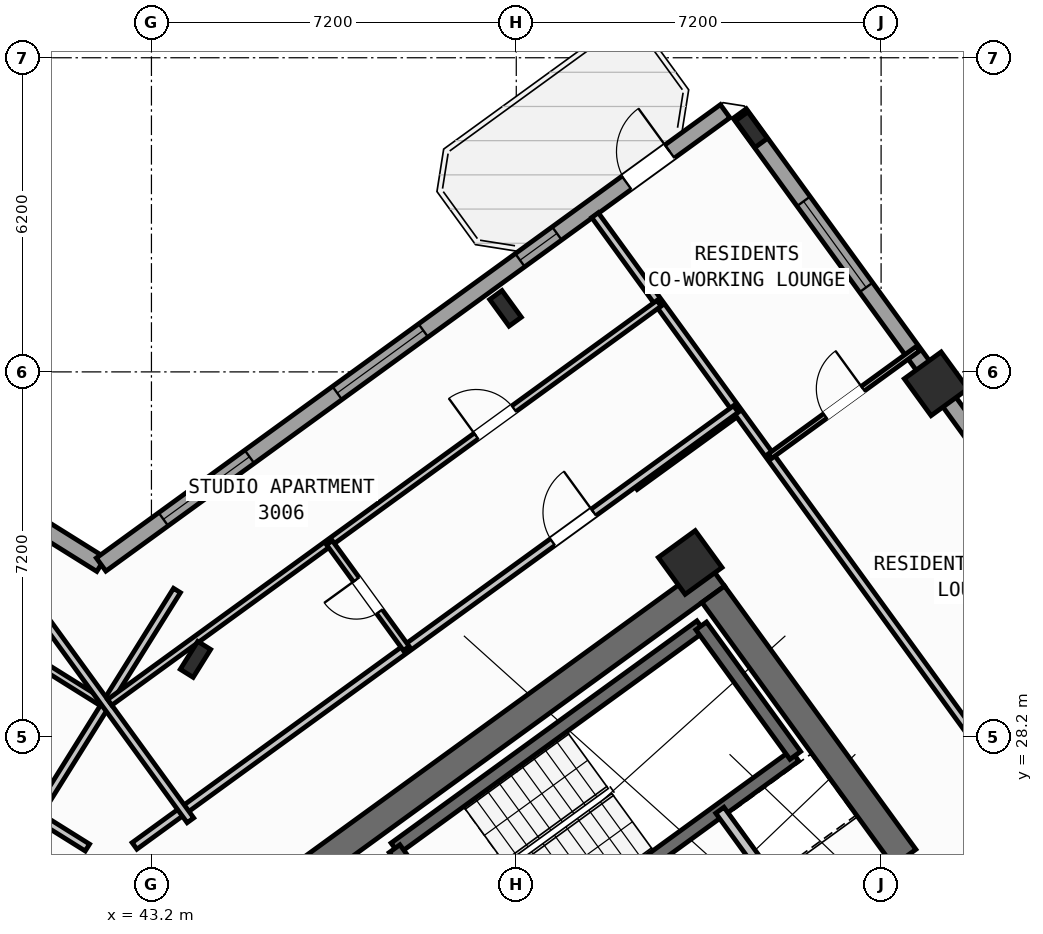
"""IFC4 building model, lengths in metres.
Left out: names, types, materials, properties, quantities, classifications, styles, units other than length and angle.
Written with IfcOpenShell. Run it as: python <this file> out.ifc"""

import sys

from ifc_helpers import new_model, si_unit, direction, frame, frame_2d, origin, origin_2d, place, context, subcontext, project, spatial, rectangle, hollow_rectangle, i_section, extrude, source, transform, mapped, element, fill, save


model = new_model("IFC4")
c1 = context("Model", 3, precision=1e-05, world=origin(), true_north=direction((0.0, 1.0)))
c2 = subcontext(c1, "Body", "Model", "MODEL_VIEW")
j1 = project(units=[si_unit("LENGTHUNIT", "METRE"), si_unit("PLANEANGLEUNIT", "RADIAN")], contexts=[c1])
p1 = place(None, origin())
s1 = spatial("IfcSite", under=j1, at=p1, CompositionType="ELEMENT")
p2 = place(p1, origin())
s2 = spatial("IfcBuilding", under=s1, at=p2, CompositionType="ELEMENT")
p3 = place(p2, frame((0.0, 0.0, 119.7)))
s3 = spatial("IfcBuildingStorey", under=s2, at=p3, CompositionType="ELEMENT", Elevation=119.7)
p4 = place(p3, frame((44.365, 24.142, 0.0), z_axis=(0.0, 0.0, 1.0), x_axis=(0.809024304885, 0.587775190107, 0.0)))
e1 = element("IfcWall", 1, at=p4, inside=s3, PredefinedType="SHEAR", context=c2, shape_type="SweptSolid", body=[
    extrude(rectangle(XDim=12.34, YDim=0.55, at=frame_2d((6.17, 0.0))), origin(), (0.0, 0.0, 1.0), 3.35),
])
p5 = place(p3, frame((58.064, 25.813, 0.0), z_axis=(0.0, 0.0, 1.0), x_axis=(-0.587764933797, 0.809031756236, 0.0)))
e2 = element("IfcWall", 2, at=p5, inside=s3, PredefinedType="SHEAR", context=c2, shape_type="SweptSolid", body=[
    extrude(rectangle(XDim=6.425, YDim=0.55, at=frame_2d((3.212, 0.0))), origin(), (0.0, 0.0, 1.0), 3.35),
])
m1 = source(origin(), c2, "Body", "SweptSolid", [
    extrude(i_section(OverallWidth=0.3, OverallDepth=0.65, WebThickness=0.016, FlangeThickness=0.031, at=origin_2d()), origin(), (0.0, 0.0, 1.0), 3.6),
])
p6 = place(p3, frame((44.068, 29.726, 0.0), z_axis=(0.0, 0.0, 1.0), x_axis=(-0.848048096156, 0.529919264233, 0.0)))
e3 = element("IfcColumn", 3, at=p6, inside=s3, PredefinedType="COLUMN", context=c2, shape_type="MappedRepresentation", body=[
    mapped(m1, transform((0.0, 0.0, 0.0), scale=1.0)),
])
m2 = source(origin(), c2, "Body", "SweptSolid", [
    extrude(hollow_rectangle(XDim=0.9, YDim=0.9, WallThickness=0.036, at=origin_2d()), origin(), (0.0, 0.0, 1.0), 3.6),
])
p7 = place(p3, frame((53.832, 31.638, 0.0), z_axis=(0.0, 0.0, 1.0), x_axis=(0.809016994375, 0.587785252292, 0.0)))
e4 = element("IfcColumn", 4, at=p7, inside=s3, PredefinedType="COLUMN", context=c2, shape_type="MappedRepresentation", body=[
    mapped(m2, transform((0.0, 0.0, 0.0), scale=1.0)),
])
p8 = place(p3, frame((50.188, 36.654, 0.0), z_axis=(0.0, 0.0, 1.0), x_axis=(0.809016994375, 0.587785252292, 0.0)))
e5 = element("IfcColumn", 5, at=p8, inside=s3, PredefinedType="COLUMN", context=c2, shape_type="MappedRepresentation", body=[
    mapped(m1, transform((0.0, 0.0, 0.0), scale=1.0)),
])
p9 = place(p3, frame((58.686, 35.165, 0.0), z_axis=(0.0, 0.0, 1.0), x_axis=(0.809016994375, 0.587785252292, 0.0)))
e6 = element("IfcColumn", 6, at=p9, inside=s3, PredefinedType="COLUMN", context=c2, shape_type="MappedRepresentation", body=[
    mapped(m2, transform((0.0, 0.0, 0.0), scale=1.0)),
])
p10 = place(p3, frame((55.042, 40.181, 0.0), z_axis=(0.0, 0.0, 1.0), x_axis=(0.809016994375, 0.587785252292, 0.0)))
e7 = element("IfcColumn", 7, at=p10, inside=s3, PredefinedType="COLUMN", context=c2, shape_type="MappedRepresentation", body=[
    mapped(m1, transform((0.0, 0.0, 0.0), scale=1.0)),
])
p11 = place(p3, frame((17.424, 47.083, 0.0), z_axis=(0.0, 0.0, 1.0), x_axis=(0.848049927979, -0.529916332693, 0.0)))
e8 = element("IfcWall", 8, at=p11, inside=s3, PredefinedType="STANDARD", context=c2, shape_type="SweptSolid", body=[
    extrude(rectangle(XDim=29.223, YDim=0.32, at=frame_2d((14.612, 0.0))), origin(), (0.0, 0.0, 1.0), 3.35),
])
p12 = place(p11, frame((8.839, 0.0, 0.0)))
e9 = element("IfcOpeningElement", 9, at=p12, cuts=e8, PredefinedType="OPENING", context=c2, shape_type="SweptSolid", body=[
    extrude(rectangle(XDim=1.05, YDim=2.15, at=frame_2d((0.525, 1.075))), frame((0.0, 0.17, 0.0), z_axis=(0.0, -1.0, 0.0), x_axis=(1.0, 0.0, 0.0)), (0.0, 0.0, 1.0), 0.34),
])
p13 = place(p11, frame((0.719, 0.0, 0.85)))
e10 = element("IfcOpeningElement", 10, at=p13, cuts=e8, PredefinedType="OPENING", context=c2, shape_type="SweptSolid", body=[
    extrude(rectangle(XDim=1.8, YDim=1.5, at=frame_2d((0.9, 0.75))), frame((0.0, 0.17, 0.0), z_axis=(0.0, -1.0, 0.0), x_axis=(1.0, 0.0, 0.0)), (0.0, 0.0, 1.0), 0.34),
])
p14 = place(p11, frame((3.981, 0.0, 0.85)))
e11 = element("IfcOpeningElement", 11, at=p14, cuts=e8, PredefinedType="OPENING", context=c2, shape_type="SweptSolid", body=[
    extrude(rectangle(XDim=1.5, YDim=1.5, at=frame_2d((0.75, 0.75))), frame((0.0, 0.17, 0.0), z_axis=(0.0, -1.0, 0.0), x_axis=(1.0, 0.0, 0.0)), (0.0, 0.0, 1.0), 0.34),
])
p15 = place(p11, frame((7.021, 0.0, 0.95)))
e12 = element("IfcOpeningElement", 12, at=p15, cuts=e8, PredefinedType="OPENING", context=c2, shape_type="SweptSolid", body=[
    extrude(rectangle(XDim=1.2, YDim=1.4, at=frame_2d((0.6, 0.7))), frame((0.0, 0.17, 0.0), z_axis=(0.0, -1.0, 0.0), x_axis=(1.0, 0.0, 0.0)), (0.0, 0.0, 1.0), 0.34),
])
p16 = place(p11, frame((14.471, 0.0, 0.95)))
e13 = element("IfcOpeningElement", 13, at=p16, cuts=e8, PredefinedType="OPENING", context=c2, shape_type="SweptSolid", body=[
    extrude(rectangle(XDim=1.2, YDim=1.4, at=frame_2d((0.6, 0.7))), frame((0.0, 0.17, 0.0), z_axis=(0.0, -1.0, 0.0), x_axis=(1.0, 0.0, 0.0)), (0.0, 0.0, 1.0), 0.34),
])
p17 = place(p11, frame((17.254, 0.0, 1.0)))
e14 = element("IfcOpeningElement", 14, at=p17, cuts=e8, PredefinedType="OPENING", context=c2, shape_type="SweptSolid", body=[
    extrude(rectangle(XDim=0.9, YDim=1.25, at=frame_2d((0.45, 0.625))), frame((0.0, 0.17, 0.0), z_axis=(0.0, -1.0, 0.0), x_axis=(1.0, 0.0, 0.0)), (0.0, 0.0, 1.0), 0.34),
])
p18 = place(p11, frame((20.764, 0.0, 0.8)))
e15 = element("IfcOpeningElement", 15, at=p18, cuts=e8, PredefinedType="OPENING", context=c2, shape_type="SweptSolid", body=[
    extrude(rectangle(XDim=2.1, YDim=1.55, at=frame_2d((1.05, 0.775))), frame((0.0, 0.17, 0.0), z_axis=(0.0, -1.0, 0.0), x_axis=(1.0, 0.0, 0.0)), (0.0, 0.0, 1.0), 0.34),
])
p19 = place(p11, frame((25.403, 0.0, 0.8)))
e16 = element("IfcOpeningElement", 16, at=p19, cuts=e8, PredefinedType="OPENING", context=c2, shape_type="SweptSolid", body=[
    extrude(rectangle(XDim=2.1, YDim=1.55, at=frame_2d((1.05, 0.775))), frame((0.0, 0.17, 0.0), z_axis=(0.0, -1.0, 0.0), x_axis=(1.0, 0.0, 0.0)), (0.0, 0.0, 1.0), 0.34),
])
p20 = place(p3, frame((42.207, 31.597, 0.0), z_axis=(0.0, 0.0, 1.0), x_axis=(0.809020333377, 0.587780656523, 0.0)))
e17 = element("IfcWall", 17, at=p20, inside=s3, PredefinedType="STANDARD", context=c2, shape_type="SweptSolid", body=[
    extrude(rectangle(XDim=15.223, YDim=0.32, at=frame_2d((7.611, 0.0))), origin(), (0.0, 0.0, 1.0), 3.35),
])
p21 = place(p20, frame((12.82, 0.0, 0.0)))
e18 = element("IfcOpeningElement", 18, at=p21, cuts=e17, PredefinedType="OPENING", context=c2, shape_type="SweptSolid", body=[
    extrude(rectangle(XDim=1.05, YDim=2.15, at=frame_2d((0.525, 1.075))), frame((0.0, 0.17, 0.0), z_axis=(0.0, -1.0, 0.0), x_axis=(1.0, 0.0, 0.0)), (0.0, 0.0, 1.0), 0.34),
])
p22 = place(p20, frame((1.52, 0.0, 0.8)))
e19 = element("IfcOpeningElement", 19, at=p22, cuts=e17, PredefinedType="OPENING", context=c2, shape_type="SweptSolid", body=[
    extrude(rectangle(XDim=2.1, YDim=1.55, at=frame_2d((1.05, 0.775))), frame((0.0, 0.17, 0.0), z_axis=(0.0, -1.0, 0.0), x_axis=(1.0, 0.0, 0.0)), (0.0, 0.0, 1.0), 0.34),
])
p23 = place(p20, frame((5.76, 0.0, 0.8)))
e20 = element("IfcOpeningElement", 20, at=p23, cuts=e17, PredefinedType="OPENING", context=c2, shape_type="SweptSolid", body=[
    extrude(rectangle(XDim=2.1, YDim=1.55, at=frame_2d((1.05, 0.775))), frame((0.0, 0.17, 0.0), z_axis=(0.0, -1.0, 0.0), x_axis=(1.0, 0.0, 0.0)), (0.0, 0.0, 1.0), 0.34),
])
p24 = place(p20, frame((10.219, 0.0, 1.0)))
e21 = element("IfcOpeningElement", 21, at=p24, cuts=e17, PredefinedType="OPENING", context=c2, shape_type="SweptSolid", body=[
    extrude(rectangle(XDim=0.9, YDim=1.25, at=frame_2d((0.45, 0.625))), frame((0.0, 0.17, 0.0), z_axis=(0.0, -1.0, 0.0), x_axis=(1.0, 0.0, 0.0)), (0.0, 0.0, 1.0), 0.34),
])
p25 = place(p3, frame((54.81, 40.5, 0.0), z_axis=(0.0, 0.0, 1.0), x_axis=(0.587783625747, -0.809018176127, 0.0)))
e22 = element("IfcWall", 22, at=p25, inside=s3, PredefinedType="STANDARD", context=c2, shape_type="SweptSolid", body=[
    extrude(rectangle(XDim=21.587, YDim=0.32, at=frame_2d((10.794, 0.0))), origin(), (0.0, 0.0, 1.0), 2.775),
])
p26 = place(p25, frame((2.143, 0.0, 0.8)))
e23 = element("IfcOpeningElement", 23, at=p26, cuts=e22, PredefinedType="OPENING", context=c2, shape_type="SweptSolid", body=[
    extrude(rectangle(XDim=2.1, YDim=1.55, at=frame_2d((1.05, 0.775))), frame((0.0, 0.17, 0.0), z_axis=(0.0, -1.0, 0.0), x_axis=(1.0, 0.0, 0.0)), (0.0, 0.0, 1.0), 0.34),
])
p27 = place(p25, frame((9.344, 0.0, 0.85)))
e24 = element("IfcOpeningElement", 24, at=p27, cuts=e22, PredefinedType="OPENING", context=c2, shape_type="SweptSolid", body=[
    extrude(rectangle(XDim=1.8, YDim=1.5, at=frame_2d((0.9, 0.75))), frame((0.0, 0.17, 0.0), z_axis=(0.0, -1.0, 0.0), x_axis=(1.0, 0.0, 0.0)), (0.0, 0.0, 1.0), 0.34),
])
p28 = place(p25, frame((18.309, 0.0, 0.85)))
e25 = element("IfcOpeningElement", 25, at=p28, cuts=e22, PredefinedType="OPENING", context=c2, shape_type="SweptSolid", body=[
    extrude(rectangle(XDim=1.5, YDim=1.5, at=frame_2d((0.75, 0.75))), frame((0.0, 0.17, 0.0), z_axis=(0.0, -1.0, 0.0), x_axis=(1.0, 0.0, 0.0)), (0.0, 0.0, 1.0), 0.34),
])
p29 = place(p3, frame((48.006, 25.996, 0.0), z_axis=(0.0, 0.0, 1.0), x_axis=(0.80901903764, 0.587782439969, 0.0)))
e26 = element("IfcWall", 26, at=p29, inside=s3, PredefinedType="SHEAR", context=c2, shape_type="SweptSolid", body=[
    extrude(rectangle(XDim=7.46, YDim=0.26, at=frame_2d((3.73, 0.0))), origin(), (0.0, 0.0, 1.0), 3.35),
])
p30 = place(p3, frame((49.863, 23.44, 0.0), z_axis=(0.0, 0.0, 1.0), x_axis=(0.809003474932, 0.587803859759, 0.0)))
e27 = element("IfcWall", 27, at=p30, inside=s3, PredefinedType="SHEAR", context=c2, shape_type="SweptSolid", body=[
    extrude(rectangle(XDim=7.46, YDim=0.26, at=frame_2d((3.73, 0.0))), origin(), (0.0, 0.0, 1.0), 3.35),
])
p31 = place(p30, frame((0.36, 0.0, 0.0)))
e28 = element("IfcOpeningElement", 28, at=p31, cuts=e27, PredefinedType="OPENING", context=c2, shape_type="SweptSolid", body=[
    extrude(rectangle(XDim=0.86, YDim=2.05, at=frame_2d((0.43, 1.025))), frame((0.0, 0.14, 0.0), z_axis=(0.0, -1.0, 0.0), x_axis=(1.0, 0.0, 0.0)), (0.0, 0.0, 1.0), 0.28),
])
p32 = place(p3, frame((49.855, 23.434, 0.0), z_axis=(0.0, 0.0, 1.0), x_axis=(-0.58776738483, 0.809029975545, 0.0)))
e29 = element("IfcWall", 29, at=p32, inside=s3, PredefinedType="SHEAR", context=c2, shape_type="SweptSolid", body=[
    extrude(rectangle(XDim=3.16, YDim=0.26, at=frame_2d((1.58, 0.0))), origin(), (0.0, 0.0, 1.0), 3.35),
])
p33 = place(p3, frame((55.906, 27.831, 0.0), z_axis=(0.0, 0.0, 1.0), x_axis=(-0.587804123638, 0.809003283204, 0.0)))
e30 = element("IfcWall", 30, at=p33, inside=s3, PredefinedType="SHEAR", context=c2, shape_type="SweptSolid", body=[
    extrude(rectangle(XDim=3.16, YDim=0.26, at=frame_2d((1.58, 0.0))), origin(), (0.0, 0.0, 1.0), 3.35),
])
p34 = place(p3, frame((56.111, 24.419, 0.0), z_axis=(0.0, 0.0, 1.0), x_axis=(-0.58777848983, 0.809021907548, 0.0)))
e31 = element("IfcWall", 31, at=p34, inside=s3, PredefinedType="STANDARD", context=c2, shape_type="SweptSolid", body=[
    extrude(rectangle(XDim=2.88, YDim=0.2, at=frame_2d((1.44, 0.0))), origin(), (0.0, 0.0, 1.0), 3.34),
])
p35 = place(p3, frame((41.936, 26.012, 0.0), z_axis=(0.0, 0.0, 1.0), x_axis=(-0.848051154596, 0.529914369676, 0.0)))
e32 = element("IfcWall", 32, at=p35, inside=s3, PredefinedType="PARTITIONING", context=c2, shape_type="SweptSolid", body=[
    extrude(rectangle(XDim=15.57, YDim=0.16, at=frame_2d((7.785, 0.0))), origin(), (0.0, 0.0, 1.0), 3.34),
])
p36 = place(p35, frame((10.83, 0.0, 0.0)))
e33 = element("IfcOpeningElement", 33, at=p36, cuts=e32, PredefinedType="OPENING", context=c2, shape_type="SweptSolid", body=[
    extrude(rectangle(XDim=1.0, YDim=2.1, at=frame_2d((0.5, 1.05))), frame((0.0, 0.09, 0.0), z_axis=(0.0, -1.0, 0.0), x_axis=(1.0, 0.0, 0.0)), (0.0, 0.0, 1.0), 0.18),
])
p37 = place(p3, frame((43.704, 31.086, 0.0), z_axis=(0.0, 0.0, 1.0), x_axis=(-0.529906828443, -0.848055866774, 0.0)))
e34 = element("IfcWall", 34, at=p37, inside=s3, PredefinedType="PARTITIONING", context=c2, shape_type="SweptSolid", body=[
    extrude(rectangle(XDim=5.48, YDim=0.16, at=frame_2d((2.74, 0.0))), origin(), (0.0, 0.0, 1.0), 3.34),
])
p38 = place(p3, frame((42.226, 28.873, 0.0), z_axis=(0.0, 0.0, 1.0), x_axis=(-0.848049134363, 0.529917602752, 0.0)))
e35 = element("IfcWall", 35, at=p38, inside=s3, PredefinedType="PLUMBINGWALL", context=c2, shape_type="SweptSolid", body=[
    extrude(rectangle(XDim=14.3, YDim=0.14, at=frame_2d((7.15, 0.0))), origin(), (0.0, 0.0, 1.0), 3.34),
])
p39 = place(p38, frame((9.57, 0.0, 0.0)))
e36 = element("IfcOpeningElement", 36, at=p39, cuts=e35, PredefinedType="OPENING", context=c2, shape_type="SweptSolid", body=[
    extrude(rectangle(XDim=0.92, YDim=2.08, at=frame_2d((0.46, 1.04))), frame((0.0, 0.08, 0.0), z_axis=(0.0, -1.0, 0.0), x_axis=(1.0, 0.0, 0.0)), (0.0, 0.0, 1.0), 0.16),
])
p40 = place(p3, frame((52.739, 33.143, 0.0), z_axis=(0.0, 0.0, 1.0), x_axis=(0.809000999347, 0.58780726693, 0.0)))
e37 = element("IfcWall", 37, at=p40, inside=s3, PredefinedType="PARTITIONING", context=c2, shape_type="SweptSolid", body=[
    extrude(rectangle(XDim=2.51, YDim=0.16, at=frame_2d((1.255, 0.0))), origin(), (0.0, 0.0, 1.0), 3.34),
])
p41 = place(p3, frame((60.829, 26.278, 0.0), z_axis=(0.0, 0.0, 1.0), x_axis=(-0.587777474174, 0.809022645451, 0.0)))
e38 = element("IfcWall", 38, at=p41, inside=s3, PredefinedType="PARTITIONING", context=c2, shape_type="SweptSolid", body=[
    extrude(rectangle(XDim=15.1, YDim=0.16, at=frame_2d((7.55, 0.0))), origin(), (0.0, 0.0, 1.0), 3.34),
])
p42 = place(p3, frame((55.409, 33.738, 0.0), z_axis=(0.0, 0.0, 1.0), x_axis=(0.809005039917, 0.58780170584, 0.0)))
e39 = element("IfcWall", 39, at=p42, inside=s3, PredefinedType="PARTITIONING", context=c2, shape_type="SweptSolid", body=[
    extrude(rectangle(XDim=3.61, YDim=0.11, at=frame_2d((1.805, 0.0))), origin(), (0.0, 0.0, 1.0), 3.34),
])
p43 = place(p42, frame((1.345, 0.0, 0.0)))
e40 = element("IfcOpeningElement", 40, at=p43, cuts=e39, PredefinedType="OPENING", context=c2, shape_type="SweptSolid", body=[
    extrude(rectangle(XDim=0.92, YDim=2.08, at=frame_2d((0.46, 1.04))), frame((0.0, 0.065, 0.0), z_axis=(0.0, -1.0, 0.0), x_axis=(1.0, 0.0, 0.0)), (0.0, 0.0, 1.0), 0.13),
])
p44 = place(p3, frame((42.866, 26.044, 0.0), z_axis=(0.0, 0.0, 1.0), x_axis=(0.809020254154, 0.587780765566, 0.0)))
e41 = element("IfcWall", 41, at=p44, inside=s3, PredefinedType="PARTITIONING", context=c2, shape_type="SweptSolid", body=[
    extrude(rectangle(XDim=14.67, YDim=0.16, at=frame_2d((7.335, 0.0))), origin(), (0.0, 0.0, 1.0), 3.34),
])
p45 = place(p44, frame((10.2, 0.0, 0.0)))
e42 = element("IfcOpeningElement", 42, at=p45, cuts=e41, PredefinedType="OPENING", context=c2, shape_type="SweptSolid", body=[
    extrude(rectangle(XDim=1.0, YDim=2.1, at=frame_2d((0.5, 1.05))), frame((0.0, 0.09, 0.0), z_axis=(0.0, -1.0, 0.0), x_axis=(1.0, 0.0, 0.0)), (0.0, 0.0, 1.0), 0.18),
])
p46 = place(p3, frame((43.969, 26.55, 0.0), z_axis=(0.0, 0.0, 1.0), x_axis=(-0.587776919386, 0.80902304852, 0.0)))
e43 = element("IfcWall", 43, at=p46, inside=s3, PredefinedType="PARTITIONING", context=c2, shape_type="SweptSolid", body=[
    extrude(rectangle(XDim=5.48, YDim=0.16, at=frame_2d((2.74, 0.0))), origin(), (0.0, 0.0, 1.0), 3.34),
])
p47 = place(p3, frame((42.377, 28.878, 0.0), z_axis=(0.0, 0.0, 1.0), x_axis=(0.809020411523, 0.587780548963, 0.0)))
e44 = element("IfcWall", 44, at=p47, inside=s3, PredefinedType="PLUMBINGWALL", context=c2, shape_type="SweptSolid", body=[
    extrude(rectangle(XDim=13.4, YDim=0.14, at=frame_2d((6.7, 0.0))), origin(), (0.0, 0.0, 1.0), 3.34),
])
p48 = place(p47, frame((8.94, 0.0, 0.0)))
e45 = element("IfcOpeningElement", 45, at=p48, cuts=e44, PredefinedType="OPENING", context=c2, shape_type="SweptSolid", body=[
    extrude(rectangle(XDim=0.92, YDim=2.08, at=frame_2d((0.46, 1.04))), frame((0.0, 0.08, 0.0), z_axis=(0.0, -1.0, 0.0), x_axis=(1.0, 0.0, 0.0)), (0.0, 0.0, 1.0), 0.16),
])
p49 = place(p3, frame((48.229, 29.941, 0.0), z_axis=(0.0, 0.0, 1.0), x_axis=(-0.587772116736, 0.809026537752, 0.0)))
e46 = element("IfcWall", 46, at=p49, inside=s3, PredefinedType="PLUMBINGWALL", context=c2, shape_type="SweptSolid", body=[
    extrude(rectangle(XDim=2.58, YDim=0.14, at=frame_2d((1.29, 0.0))), origin(), (0.0, 0.0, 1.0), 3.34),
])
p50 = place(p49, frame((0.9, 0.0, 0.0)))
e47 = element("IfcOpeningElement", 47, at=p50, cuts=e46, PredefinedType="OPENING", context=c2, shape_type="SweptSolid", body=[
    extrude(rectangle(XDim=0.78, YDim=2.05, at=frame_2d((0.39, 1.025))), frame((0.0, 0.08, 0.0), z_axis=(0.0, -1.0, 0.0), x_axis=(1.0, 0.0, 0.0)), (0.0, 0.0, 1.0), 0.16),
])
m3 = source(origin(), c2, "Body", "SweptSolid", [
    extrude(rectangle(XDim=1.05, YDim=2.15, at=frame_2d((0.525, 1.075))), frame((0.0, 0.025, 0.0), z_axis=(0.0, -1.0, 0.0), x_axis=(1.0, 0.0, 0.0)), (0.0, 0.0, 1.0), 0.05),
])
p51 = place(p21, origin())
e48 = element("IfcDoor", 48, at=p51, inside=s3, OperationType="SINGLE_SWING_RIGHT", PredefinedType="DOOR", context=c2, shape_type="MappedRepresentation", body=[
    mapped(m3, transform((0.0, 0.0, 0.0), scale=1.0)),
])
fill(e18, e48)
m4 = source(origin(), c2, "Body", "SweptSolid", [
    extrude(rectangle(XDim=2.1, YDim=1.55, at=frame_2d((1.05, 0.775))), frame((0.0, 0.03, 0.0), z_axis=(0.0, -1.0, 0.0), x_axis=(1.0, 0.0, 0.0)), (0.0, 0.0, 1.0), 0.06),
])
p52 = place(p22, origin())
e49 = element("IfcWindow", 49, at=p52, inside=s3, PartitioningType="SINGLE_PANEL", PredefinedType="WINDOW", context=c2, shape_type="MappedRepresentation", body=[
    mapped(m4, transform((0.0, 0.0, 0.0), scale=1.0)),
])
fill(e19, e49)
p53 = place(p23, origin())
e50 = element("IfcWindow", 50, at=p53, inside=s3, PartitioningType="SINGLE_PANEL", PredefinedType="WINDOW", context=c2, shape_type="MappedRepresentation", body=[
    mapped(m4, transform((0.0, 0.0, 0.0), scale=1.0)),
])
fill(e20, e50)
m5 = source(origin(), c2, "Body", "SweptSolid", [
    extrude(rectangle(XDim=0.9, YDim=1.25, at=frame_2d((0.45, 0.625))), frame((0.0, 0.03, 0.0), z_axis=(0.0, -1.0, 0.0), x_axis=(1.0, 0.0, 0.0)), (0.0, 0.0, 1.0), 0.06),
])
p54 = place(p24, origin())
e51 = element("IfcWindow", 51, at=p54, inside=s3, PartitioningType="SINGLE_PANEL", PredefinedType="WINDOW", context=c2, shape_type="MappedRepresentation", body=[
    mapped(m5, transform((0.0, 0.0, 0.0), scale=1.0)),
])
fill(e21, e51)
p55 = place(p26, origin())
e52 = element("IfcWindow", 52, at=p55, inside=s3, PartitioningType="SINGLE_PANEL", PredefinedType="WINDOW", context=c2, shape_type="MappedRepresentation", body=[
    mapped(m4, transform((0.0, 0.0, 0.0), scale=1.0)),
])
fill(e23, e52)
m6 = source(origin(), c2, "Body", "SweptSolid", [
    extrude(rectangle(XDim=0.92, YDim=2.08, at=frame_2d((0.46, 1.04))), frame((0.0, 0.025, 0.0), z_axis=(0.0, -1.0, 0.0), x_axis=(1.0, 0.0, 0.0)), (0.0, 0.0, 1.0), 0.05),
])
p56 = place(p43, origin())
e53 = element("IfcDoor", 53, at=p56, inside=s3, OperationType="SINGLE_SWING_RIGHT", PredefinedType="DOOR", context=c2, shape_type="MappedRepresentation", body=[
    mapped(m6, transform((0.0, 0.0, 0.0), scale=1.0)),
])
fill(e40, e53)
m7 = source(origin(), c2, "Body", "SweptSolid", [
    extrude(rectangle(XDim=1.0, YDim=2.1, at=frame_2d((0.5, 1.05))), frame((0.0, 0.025, 0.0), z_axis=(0.0, -1.0, 0.0), x_axis=(1.0, 0.0, 0.0)), (0.0, 0.0, 1.0), 0.05),
])
p57 = place(p45, origin())
e54 = element("IfcDoor", 54, at=p57, inside=s3, OperationType="SINGLE_SWING_RIGHT", PredefinedType="DOOR", context=c2, shape_type="MappedRepresentation", body=[
    mapped(m7, transform((0.0, 0.0, 0.0), scale=1.0)),
])
fill(e42, e54)
p58 = place(p48, origin())
e55 = element("IfcDoor", 55, at=p58, inside=s3, OperationType="SINGLE_SWING_LEFT", PredefinedType="DOOR", context=c2, shape_type="MappedRepresentation", body=[
    mapped(m6, transform((0.0, 0.0, 0.0), scale=1.0)),
])
fill(e45, e55)
m8 = source(origin(), c2, "Body", "SweptSolid", [
    extrude(rectangle(XDim=0.78, YDim=2.05, at=frame_2d((0.39, 1.025))), frame((0.0, 0.025, 0.0), z_axis=(0.0, -1.0, 0.0), x_axis=(1.0, 0.0, 0.0)), (0.0, 0.0, 1.0), 0.05),
])
p59 = place(p50, origin())
e56 = element("IfcDoor", 56, at=p59, inside=s3, OperationType="SINGLE_SWING_RIGHT", PredefinedType="DOOR", context=c2, shape_type="MappedRepresentation", body=[
    mapped(m8, transform((0.0, 0.0, 0.0), scale=1.0)),
])
fill(e47, e56)
save(model, sys.argv[1])
